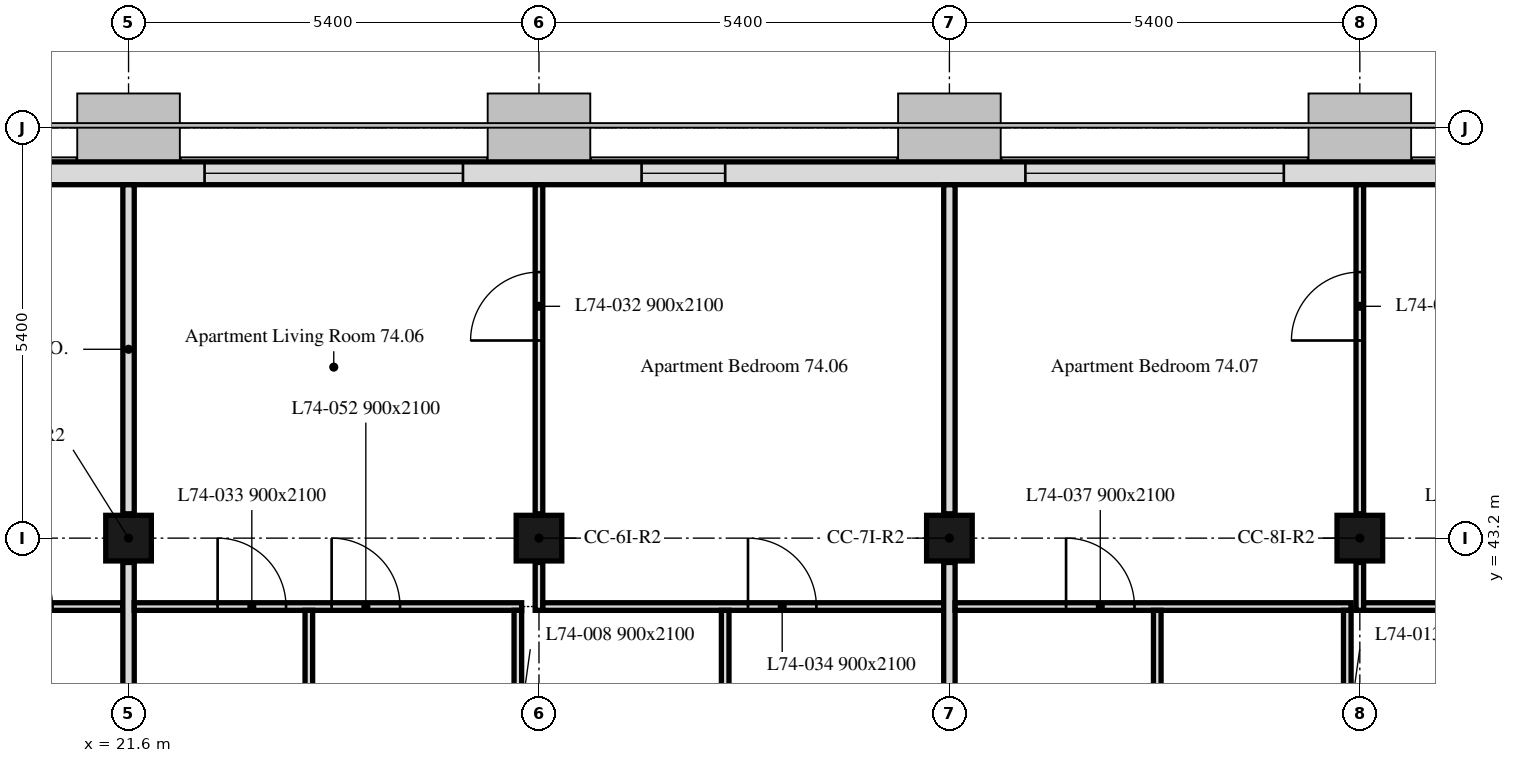
"""IFC4 building model, lengths in metres.
Left out: names, types, materials, properties, quantities, classifications, styles, units other than length and angle.
Written with IfcOpenShell. Run it as: python <this file> out.ifc"""

import sys

from ifc_helpers import new_model, si_unit, direction, frame, frame_2d, origin, origin_2d, place, context, subcontext, project, spatial, rectangle, extrude, element, fill, save


model = new_model("IFC4")
c1 = context("Model", 3, precision=1e-05, world=origin(), true_north=direction((0.0, 1.0)))
c2 = subcontext(c1, "Body", "Model", "MODEL_VIEW")
j1 = project(units=[si_unit("LENGTHUNIT", "METRE"), si_unit("PLANEANGLEUNIT", "RADIAN")], contexts=[c1])
p1 = place(None, origin())
s1 = spatial("IfcSite", under=j1, at=p1, CompositionType="ELEMENT")
p2 = place(p1, origin())
s2 = spatial("IfcBuilding", under=s1, at=p2, CompositionType="ELEMENT")
p3 = place(p2, frame((0.0, 0.0, 298.3)))
s3 = spatial("IfcBuildingStorey", under=s2, at=p3, CompositionType="ELEMENT", Elevation=298.3)
for number, where, z_axis, x_axis in (
    (1, (21.6, 43.2, 0.0), (0.0, 0.0, 1.0), (1.0, 0.0, 0.0)),
    (2, (27.0, 43.2, 0.0), (0.0, 0.0, 1.0), (1.0, 0.0, 0.0)),
    (3, (32.4, 43.2, 0.0), (0.0, 0.0, 1.0), (1.0, 0.0, 0.0)),
    (4, (37.8, 43.2, 0.0), (0.0, 0.0, 1.0), (1.0, 0.0, 0.0)),
):
    element("IfcColumn", number, at=place(p3, frame(where, z_axis=z_axis, x_axis=x_axis)), inside=s3, PredefinedType="COLUMN", context=c2, shape_type="SweptSolid", body=[
        extrude(rectangle(XDim=0.6, YDim=0.6, at=origin_2d()), origin(), (0.0, 0.0, 1.0), 3.0),
    ])
p4 = place(p3, frame((43.014, 48.0, 0.0), z_axis=(0.0, 0.0, 1.0), x_axis=(-1.0, 0.0, 0.0)))
e5 = element("IfcWall", 5, at=p4, inside=s3, PredefinedType="SOLIDWALL", context=c2, shape_type="SweptSolid", body=[
    extrude(rectangle(XDim=32.027, YDim=0.3, at=frame_2d((16.014, 0.0))), origin(), (0.0, 0.0, 1.0), 3.0),
])
p5 = place(p4, frame((2.764, 0.0, 0.9)))
e6 = element("IfcOpeningElement", 6, at=p5, cuts=e5, PredefinedType="OPENING", context=c2, shape_type="SweptSolid", body=[
    extrude(rectangle(XDim=1.1, YDim=1.7, at=frame_2d((0.55, 0.85))), frame((0.0, 0.16, 0.0), z_axis=(0.0, -1.0, 0.0), x_axis=(1.0, 0.0, 0.0)), (0.0, 0.0, 1.0), 0.32),
])
p6 = place(p4, frame((6.214, 0.0, 0.9)))
e7 = element("IfcOpeningElement", 7, at=p6, cuts=e5, PredefinedType="OPENING", context=c2, shape_type="SweptSolid", body=[
    extrude(rectangle(XDim=3.4, YDim=1.7, at=frame_2d((1.7, 0.85))), frame((0.0, 0.16, 0.0), z_axis=(0.0, -1.0, 0.0), x_axis=(1.0, 0.0, 0.0)), (0.0, 0.0, 1.0), 0.32),
])
p7 = place(p4, frame((13.564, 0.0, 0.9)))
e8 = element("IfcOpeningElement", 8, at=p7, cuts=e5, PredefinedType="OPENING", context=c2, shape_type="SweptSolid", body=[
    extrude(rectangle(XDim=1.1, YDim=1.7, at=frame_2d((0.55, 0.85))), frame((0.0, 0.16, 0.0), z_axis=(0.0, -1.0, 0.0), x_axis=(1.0, 0.0, 0.0)), (0.0, 0.0, 1.0), 0.32),
])
p8 = place(p4, frame((17.014, 0.0, 0.9)))
e9 = element("IfcOpeningElement", 9, at=p8, cuts=e5, PredefinedType="OPENING", context=c2, shape_type="SweptSolid", body=[
    extrude(rectangle(XDim=3.4, YDim=1.7, at=frame_2d((1.7, 0.85))), frame((0.0, 0.16, 0.0), z_axis=(0.0, -1.0, 0.0), x_axis=(1.0, 0.0, 0.0)), (0.0, 0.0, 1.0), 0.32),
])
p9 = place(p4, frame((24.364, 0.0, 0.9)))
e10 = element("IfcOpeningElement", 10, at=p9, cuts=e5, PredefinedType="OPENING", context=c2, shape_type="SweptSolid", body=[
    extrude(rectangle(XDim=1.1, YDim=1.7, at=frame_2d((0.55, 0.85))), frame((0.0, 0.16, 0.0), z_axis=(0.0, -1.0, 0.0), x_axis=(1.0, 0.0, 0.0)), (0.0, 0.0, 1.0), 0.32),
])
p10 = place(p4, frame((27.814, 0.0, 0.9)))
e11 = element("IfcOpeningElement", 11, at=p10, cuts=e5, PredefinedType="OPENING", context=c2, shape_type="SweptSolid", body=[
    extrude(rectangle(XDim=3.4, YDim=1.7, at=frame_2d((1.7, 0.85))), frame((0.0, 0.16, 0.0), z_axis=(0.0, -1.0, 0.0), x_axis=(1.0, 0.0, 0.0)), (0.0, 0.0, 1.0), 0.32),
])
p11 = place(p3, frame((16.25, 42.3, 0.0), z_axis=(0.0, 0.0, 1.0), x_axis=(1.0, 0.0, 0.0)))
e12 = element("IfcWall", 12, at=p11, inside=s3, PredefinedType="PARTITIONING", context=c2, shape_type="SweptSolid", body=[
    extrude(rectangle(XDim=5.275, YDim=0.1, at=frame_2d((2.637, 0.0))), origin(), (0.0, 0.0, 1.0), 3.0),
])
p12 = place(p11, frame((2.08, 0.0, 0.0)))
e13 = element("IfcOpeningElement", 13, at=p12, cuts=e12, PredefinedType="OPENING", context=c2, shape_type="SweptSolid", body=[
    extrude(rectangle(XDim=0.9, YDim=2.1, at=frame_2d((0.45, 1.05))), frame((0.0, 0.05, 0.0), z_axis=(0.0, -1.0, 0.0), x_axis=(1.0, 0.0, 0.0)), (0.0, 0.0, 1.0), 0.1),
])
p13 = place(p11, frame((3.45, 0.0, 0.0)))
e14 = element("IfcOpeningElement", 14, at=p13, cuts=e12, PredefinedType="OPENING", context=c2, shape_type="SweptSolid", body=[
    extrude(rectangle(XDim=0.9, YDim=2.1, at=frame_2d((0.45, 1.05))), frame((0.0, 0.05, 0.0), z_axis=(0.0, -1.0, 0.0), x_axis=(1.0, 0.0, 0.0)), (0.0, 0.0, 1.0), 0.1),
])
p14 = place(p3, frame((21.6, 43.52, 0.0), z_axis=(0.0, 0.0, 1.0), x_axis=(0.0, 1.0, 0.0)))
e15 = element("IfcWall", 15, at=p14, inside=s3, PredefinedType="PARTITIONING", context=c2, shape_type="SweptSolid", body=[
    extrude(rectangle(XDim=4.329, YDim=0.15, at=frame_2d((2.165, 0.0))), origin(), (0.0, 0.0, 1.0), 2.4),
])
p15 = place(p3, frame((21.6, 38.12, 0.0), z_axis=(0.0, 0.0, 1.0), x_axis=(0.0, 1.0, 0.0)))
e16 = element("IfcWall", 16, at=p15, inside=s3, PredefinedType="PARTITIONING", context=c2, shape_type="SweptSolid", body=[
    extrude(rectangle(XDim=4.76, YDim=0.15, at=frame_2d((2.38, 0.0))), origin(), (0.0, 0.0, 1.0), 2.4),
])
p16 = place(p3, frame((21.675, 42.3, 0.0), z_axis=(0.0, 0.0, 1.0), x_axis=(1.0, 0.0, 0.0)))
e17 = element("IfcWall", 17, at=p16, inside=s3, PredefinedType="PARTITIONING", context=c2, shape_type="SweptSolid", body=[
    extrude(rectangle(XDim=5.097, YDim=0.1, at=frame_2d((2.548, 0.0))), origin(), (0.0, 0.0, 1.0), 3.0),
])
p17 = place(p16, frame((1.097, 0.0, 0.0)))
e18 = element("IfcOpeningElement", 18, at=p17, cuts=e17, PredefinedType="OPENING", context=c2, shape_type="SweptSolid", body=[
    extrude(rectangle(XDim=0.9, YDim=2.1, at=frame_2d((0.45, 1.05))), frame((0.0, 0.05, 0.0), z_axis=(0.0, -1.0, 0.0), x_axis=(1.0, 0.0, 0.0)), (0.0, 0.0, 1.0), 0.1),
])
p18 = place(p16, frame((2.597, 0.0, 0.0)))
e19 = element("IfcOpeningElement", 19, at=p18, cuts=e17, PredefinedType="OPENING", context=c2, shape_type="SweptSolid", body=[
    extrude(rectangle(XDim=0.9, YDim=2.1, at=frame_2d((0.45, 1.05))), frame((0.0, 0.05, 0.0), z_axis=(0.0, -1.0, 0.0), x_axis=(1.0, 0.0, 0.0)), (0.0, 0.0, 1.0), 0.1),
])
p19 = place(p3, frame((27.0, 42.25, 0.0), z_axis=(0.0, 0.0, 1.0), x_axis=(0.0, 1.0, 0.0)))
e20 = element("IfcWall", 20, at=p19, inside=s3, PredefinedType="PARTITIONING", context=c2, shape_type="SweptSolid", body=[
    extrude(rectangle(XDim=0.63, YDim=0.1, at=frame_2d((0.315, 0.0))), origin(), (0.0, 0.0, 1.0), 2.4),
])
p20 = place(p3, frame((27.0, 43.52, 0.0), z_axis=(0.0, 0.0, 1.0), x_axis=(0.0, 1.0, 0.0)))
e21 = element("IfcWall", 21, at=p20, inside=s3, PredefinedType="PARTITIONING", context=c2, shape_type="SweptSolid", body=[
    extrude(rectangle(XDim=4.329, YDim=0.1, at=frame_2d((2.165, 0.0))), origin(), (0.0, 0.0, 1.0), 2.4),
])
p21 = place(p20, frame((2.28, 0.0, 0.0)))
e22 = element("IfcOpeningElement", 22, at=p21, cuts=e21, PredefinedType="OPENING", context=c2, shape_type="SweptSolid", body=[
    extrude(rectangle(XDim=0.9, YDim=2.1, at=frame_2d((0.45, 1.05))), frame((0.0, 0.05, 0.0), z_axis=(0.0, -1.0, 0.0), x_axis=(1.0, 0.0, 0.0)), (0.0, 0.0, 1.0), 0.1),
])
p22 = place(p3, frame((27.05, 42.3, 0.0), z_axis=(0.0, 0.0, 1.0), x_axis=(1.0, 0.0, 0.0)))
e23 = element("IfcWall", 23, at=p22, inside=s3, PredefinedType="PARTITIONING", context=c2, shape_type="SweptSolid", body=[
    extrude(rectangle(XDim=5.275, YDim=0.1, at=frame_2d((2.637, 0.0))), origin(), (0.0, 0.0, 1.0), 3.0),
])
p23 = place(p22, frame((2.7, 0.0, 0.0)))
e24 = element("IfcOpeningElement", 24, at=p23, cuts=e23, PredefinedType="OPENING", context=c2, shape_type="SweptSolid", body=[
    extrude(rectangle(XDim=0.9, YDim=2.1, at=frame_2d((0.45, 1.05))), frame((0.0, 0.05, 0.0), z_axis=(0.0, -1.0, 0.0), x_axis=(1.0, 0.0, 0.0)), (0.0, 0.0, 1.0), 0.1),
])
p24 = place(p3, frame((32.4, 43.52, 0.0), z_axis=(0.0, 0.0, 1.0), x_axis=(0.0, 1.0, 0.0)))
e25 = element("IfcWall", 25, at=p24, inside=s3, PredefinedType="PARTITIONING", context=c2, shape_type="SweptSolid", body=[
    extrude(rectangle(XDim=4.329, YDim=0.15, at=frame_2d((2.165, 0.0))), origin(), (0.0, 0.0, 1.0), 2.4),
])
p25 = place(p3, frame((23.972, 34.275, 0.0), z_axis=(0.0, 0.0, 1.0), x_axis=(0.0, 1.0, 0.0)))
e26 = element("IfcWall", 26, at=p25, inside=s3, PredefinedType="PARTITIONING", context=c2, shape_type="SweptSolid", body=[
    extrude(rectangle(XDim=7.975, YDim=0.1, at=frame_2d((3.988, 0.0))), origin(), (0.0, 0.0, 1.0), 3.0),
])
p26 = place(p25, frame((0.825, 0.0, 0.0)))
e27 = element("IfcOpeningElement", 27, at=p26, cuts=e26, PredefinedType="OPENING", context=c2, shape_type="SweptSolid", body=[
    extrude(rectangle(XDim=0.9, YDim=2.1, at=frame_2d((0.45, 1.05))), frame((0.0, 0.05, 0.0), z_axis=(0.0, -1.0, 0.0), x_axis=(1.0, 0.0, 0.0)), (0.0, 0.0, 1.0), 0.1),
])
p27 = place(p25, frame((5.037, 0.0, 0.0)))
e28 = element("IfcOpeningElement", 28, at=p27, cuts=e26, PredefinedType="OPENING", context=c2, shape_type="SweptSolid", body=[
    extrude(rectangle(XDim=0.9, YDim=2.1, at=frame_2d((0.45, 1.05))), frame((0.0, 0.05, 0.0), z_axis=(0.0, -1.0, 0.0), x_axis=(1.0, 0.0, 0.0)), (0.0, 0.0, 1.0), 0.1),
])
p28 = place(p3, frame((26.722, 38.12, 0.0), z_axis=(0.0, 0.0, 1.0), x_axis=(0.0, 1.0, 0.0)))
e29 = element("IfcWall", 29, at=p28, inside=s3, PredefinedType="PARTITIONING", context=c2, shape_type="SweptSolid", body=[
    extrude(rectangle(XDim=4.13, YDim=0.1, at=frame_2d((2.065, 0.0))), origin(), (0.0, 0.0, 1.0), 3.0),
])
p29 = place(p28, frame((2.005, 0.0, 0.0)))
e30 = element("IfcOpeningElement", 30, at=p29, cuts=e29, PredefinedType="OPENING", context=c2, shape_type="SweptSolid", body=[
    extrude(rectangle(XDim=0.9, YDim=2.1, at=frame_2d((0.45, 1.05))), frame((0.0, 0.05, 0.0), z_axis=(0.0, -1.0, 0.0), x_axis=(1.0, 0.0, 0.0)), (0.0, 0.0, 1.0), 0.1),
])
p30 = place(p3, frame((29.45, 36.95, 0.0), z_axis=(0.0, 0.0, 1.0), x_axis=(0.0, 1.0, 0.0)))
e31 = element("IfcWall", 31, at=p30, inside=s3, PredefinedType="PARTITIONING", context=c2, shape_type="SweptSolid", body=[
    extrude(rectangle(XDim=5.3, YDim=0.1, at=frame_2d((2.65, 0.0))), origin(), (0.0, 0.0, 1.0), 3.0),
])
p31 = place(p3, frame((32.4, 38.12, 0.0), z_axis=(0.0, 0.0, 1.0), x_axis=(0.0, 1.0, 0.0)))
e32 = element("IfcWall", 32, at=p31, inside=s3, PredefinedType="PARTITIONING", context=c2, shape_type="SweptSolid", body=[
    extrude(rectangle(XDim=4.76, YDim=0.15, at=frame_2d((2.38, 0.0))), origin(), (0.0, 0.0, 1.0), 2.4),
])
p32 = place(p3, frame((32.475, 42.3, 0.0), z_axis=(0.0, 0.0, 1.0), x_axis=(1.0, 0.0, 0.0)))
e33 = element("IfcWall", 33, at=p32, inside=s3, PredefinedType="PARTITIONING", context=c2, shape_type="SweptSolid", body=[
    extrude(rectangle(XDim=5.21, YDim=0.1, at=frame_2d((2.605, 0.0))), origin(), (0.0, 0.0, 1.0), 3.0),
])
p33 = place(p32, frame((1.46, 0.0, 0.0)))
e34 = element("IfcOpeningElement", 34, at=p33, cuts=e33, PredefinedType="OPENING", context=c2, shape_type="SweptSolid", body=[
    extrude(rectangle(XDim=0.9, YDim=2.1, at=frame_2d((0.45, 1.05))), frame((0.0, 0.05, 0.0), z_axis=(0.0, -1.0, 0.0), x_axis=(1.0, 0.0, 0.0)), (0.0, 0.0, 1.0), 0.1),
])
p34 = place(p3, frame((37.8, 42.25, 0.0), z_axis=(0.0, 0.0, 1.0), x_axis=(0.0, 1.0, 0.0)))
e35 = element("IfcWall", 35, at=p34, inside=s3, PredefinedType="PARTITIONING", context=c2, shape_type="SweptSolid", body=[
    extrude(rectangle(XDim=0.63, YDim=0.1, at=frame_2d((0.315, 0.0))), origin(), (0.0, 0.0, 1.0), 2.4),
])
p35 = place(p3, frame((37.8, 43.52, 0.0), z_axis=(0.0, 0.0, 1.0), x_axis=(0.0, 1.0, 0.0)))
e36 = element("IfcWall", 36, at=p35, inside=s3, PredefinedType="PARTITIONING", context=c2, shape_type="SweptSolid", body=[
    extrude(rectangle(XDim=4.329, YDim=0.1, at=frame_2d((2.165, 0.0))), origin(), (0.0, 0.0, 1.0), 2.4),
])
p36 = place(p35, frame((2.28, 0.0, 0.0)))
e37 = element("IfcOpeningElement", 37, at=p36, cuts=e36, PredefinedType="OPENING", context=c2, shape_type="SweptSolid", body=[
    extrude(rectangle(XDim=0.9, YDim=2.1, at=frame_2d((0.45, 1.05))), frame((0.0, 0.05, 0.0), z_axis=(0.0, -1.0, 0.0), x_axis=(1.0, 0.0, 0.0)), (0.0, 0.0, 1.0), 0.1),
])
p37 = place(p3, frame((37.85, 42.3, 0.0), z_axis=(0.0, 0.0, 1.0), x_axis=(1.0, 0.0, 0.0)))
e38 = element("IfcWall", 38, at=p37, inside=s3, PredefinedType="PARTITIONING", context=c2, shape_type="SweptSolid", body=[
    extrude(rectangle(XDim=5.4, YDim=0.1, at=frame_2d((2.7, 0.0))), origin(), (0.0, 0.0, 1.0), 3.0),
])
p38 = place(p37, frame((1.335, 0.0, 0.0)))
e39 = element("IfcOpeningElement", 39, at=p38, cuts=e38, PredefinedType="OPENING", context=c2, shape_type="SweptSolid", body=[
    extrude(rectangle(XDim=0.9, YDim=2.1, at=frame_2d((0.45, 1.05))), frame((0.0, 0.05, 0.0), z_axis=(0.0, -1.0, 0.0), x_axis=(1.0, 0.0, 0.0)), (0.0, 0.0, 1.0), 0.1),
])
p39 = place(p3, frame((35.135, 36.95, 0.0), z_axis=(0.0, 0.0, 1.0), x_axis=(0.0, 1.0, 0.0)))
e40 = element("IfcWall", 40, at=p39, inside=s3, PredefinedType="PARTITIONING", context=c2, shape_type="SweptSolid", body=[
    extrude(rectangle(XDim=5.3, YDim=0.1, at=frame_2d((2.65, 0.0))), origin(), (0.0, 0.0, 1.0), 2.4),
])
p40 = place(p3, frame((37.635, 38.12, 0.0), z_axis=(0.0, 0.0, 1.0), x_axis=(0.0, 1.0, 0.0)))
e41 = element("IfcWall", 41, at=p40, inside=s3, PredefinedType="PARTITIONING", context=c2, shape_type="SweptSolid", body=[
    extrude(rectangle(XDim=4.13, YDim=0.1, at=frame_2d((2.065, 0.0))), origin(), (0.0, 0.0, 1.0), 2.4),
])
p41 = place(p40, frame((2.005, 0.0, 0.0)))
e42 = element("IfcOpeningElement", 42, at=p41, cuts=e41, PredefinedType="OPENING", context=c2, shape_type="SweptSolid", body=[
    extrude(rectangle(XDim=0.9, YDim=2.1, at=frame_2d((0.45, 1.05))), frame((0.0, 0.05, 0.0), z_axis=(0.0, -1.0, 0.0), x_axis=(1.0, 0.0, 0.0)), (0.0, 0.0, 1.0), 0.1),
])
p42 = place(p6, origin())
e43 = element("IfcWindow", 43, at=p42, inside=s3, PartitioningType="SINGLE_PANEL", PredefinedType="WINDOW", context=c2, shape_type="SweptSolid", body=[
    extrude(rectangle(XDim=3.4, YDim=1.7, at=frame_2d((1.7, 0.85))), frame((0.0, 0.03, 0.0), z_axis=(0.0, -1.0, 0.0), x_axis=(1.0, 0.0, 0.0)), (0.0, 0.0, 1.0), 0.06),
])
fill(e7, e43)
p43 = place(p7, origin())
e44 = element("IfcWindow", 44, at=p43, inside=s3, PartitioningType="SINGLE_PANEL", PredefinedType="WINDOW", context=c2, shape_type="SweptSolid", body=[
    extrude(rectangle(XDim=1.1, YDim=1.7, at=frame_2d((0.55, 0.85))), frame((0.0, 0.03, 0.0), z_axis=(0.0, -1.0, 0.0), x_axis=(1.0, 0.0, 0.0)), (0.0, 0.0, 1.0), 0.06),
])
fill(e8, e44)
p44 = place(p8, origin())
e45 = element("IfcWindow", 45, at=p44, inside=s3, PartitioningType="SINGLE_PANEL", PredefinedType="WINDOW", context=c2, shape_type="SweptSolid", body=[
    extrude(rectangle(XDim=3.4, YDim=1.7, at=frame_2d((1.7, 0.85))), frame((0.0, 0.03, 0.0), z_axis=(0.0, -1.0, 0.0), x_axis=(1.0, 0.0, 0.0)), (0.0, 0.0, 1.0), 0.06),
])
fill(e9, e45)
p45 = place(p21, origin())
e46 = element("IfcDoor", 46, at=p45, inside=s3, OperationType="SINGLE_SWING_RIGHT", PredefinedType="DOOR", context=c2, shape_type="SweptSolid", body=[
    extrude(rectangle(XDim=0.9, YDim=2.1, at=frame_2d((0.45, 1.05))), frame((0.0, 0.025, 0.0), z_axis=(0.0, -1.0, 0.0), x_axis=(1.0, 0.0, 0.0)), (0.0, 0.0, 1.0), 0.05),
])
fill(e22, e46)
p46 = place(p17, origin())
e47 = element("IfcDoor", 47, at=p46, inside=s3, OperationType="SINGLE_SWING_RIGHT", PredefinedType="DOOR", context=c2, shape_type="SweptSolid", body=[
    extrude(rectangle(XDim=0.9, YDim=2.1, at=frame_2d((0.45, 1.05))), frame((0.0, 0.025, 0.0), z_axis=(0.0, -1.0, 0.0), x_axis=(1.0, 0.0, 0.0)), (0.0, 0.0, 1.0), 0.05),
])
fill(e18, e47)
p47 = place(p23, origin())
e48 = element("IfcDoor", 48, at=p47, inside=s3, OperationType="SINGLE_SWING_LEFT", PredefinedType="DOOR", context=c2, shape_type="SweptSolid", body=[
    extrude(rectangle(XDim=0.9, YDim=2.1, at=frame_2d((0.45, 1.05))), frame((0.0, 0.025, 0.0), z_axis=(0.0, -1.0, 0.0), x_axis=(1.0, 0.0, 0.0)), (0.0, 0.0, 1.0), 0.05),
])
fill(e24, e48)
p48 = place(p36, origin())
e49 = element("IfcDoor", 49, at=p48, inside=s3, OperationType="SINGLE_SWING_LEFT", PredefinedType="DOOR", context=c2, shape_type="SweptSolid", body=[
    extrude(rectangle(XDim=0.9, YDim=2.1, at=frame_2d((0.45, 1.05))), frame((0.0, 0.025, 0.0), z_axis=(0.0, -1.0, 0.0), x_axis=(1.0, 0.0, 0.0)), (0.0, 0.0, 1.0), 0.05),
])
fill(e37, e49)
p49 = place(p33, origin())
e50 = element("IfcDoor", 50, at=p49, inside=s3, OperationType="SINGLE_SWING_RIGHT", PredefinedType="DOOR", context=c2, shape_type="SweptSolid", body=[
    extrude(rectangle(XDim=0.9, YDim=2.1, at=frame_2d((0.45, 1.05))), frame((0.0, 0.025, 0.0), z_axis=(0.0, -1.0, 0.0), x_axis=(1.0, 0.0, 0.0)), (0.0, 0.0, 1.0), 0.05),
])
fill(e34, e50)
p50 = place(p18, origin())
e51 = element("IfcDoor", 51, at=p50, inside=s3, OperationType="SINGLE_SWING_LEFT", PredefinedType="DOOR", context=c2, shape_type="SweptSolid", body=[
    extrude(rectangle(XDim=0.9, YDim=2.1, at=frame_2d((0.45, 1.05))), frame((0.0, 0.025, 0.0), z_axis=(0.0, -1.0, 0.0), x_axis=(1.0, 0.0, 0.0)), (0.0, 0.0, 1.0), 0.05),
])
fill(e19, e51)
save(model, sys.argv[1])
